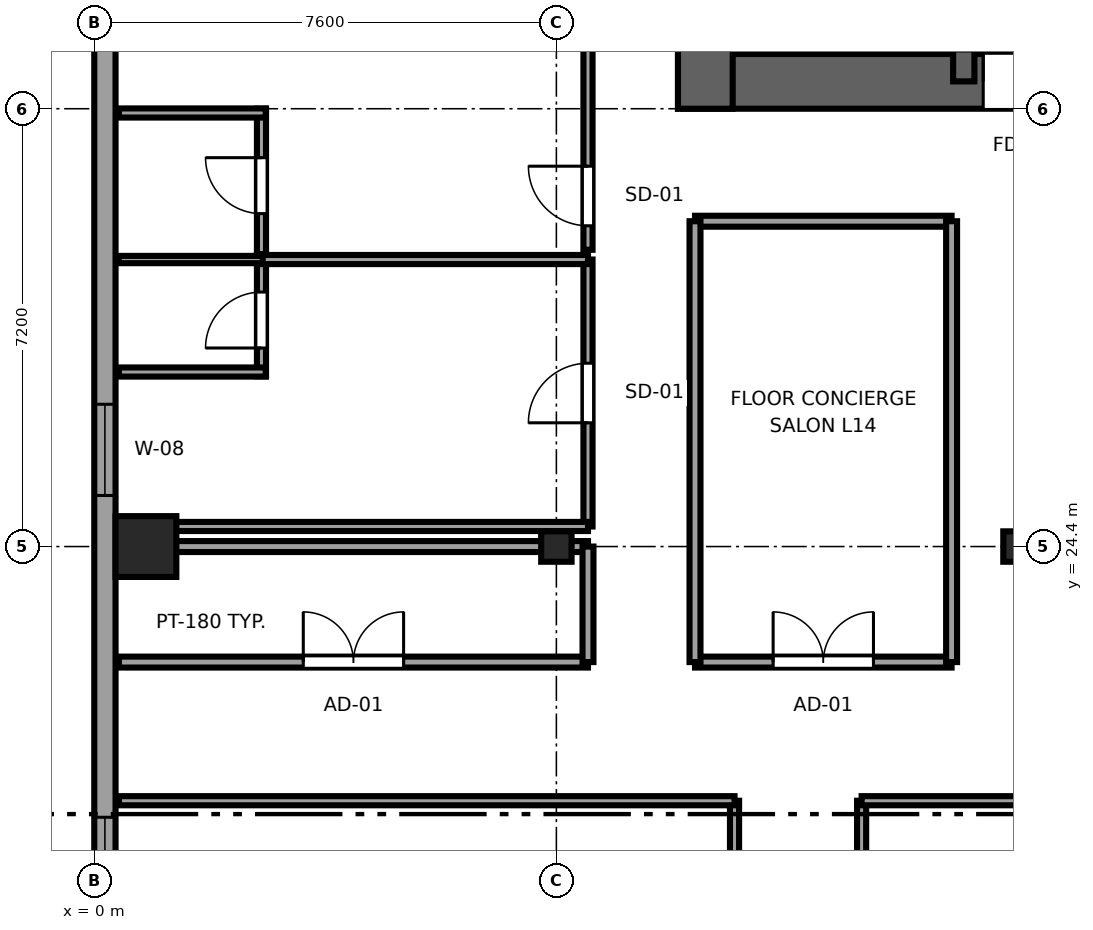
"""IFC4 building model, lengths in metres.
Left out: names, types, materials, properties, quantities, classifications, styles, units other than length and angle.
Written with IfcOpenShell. Run it as: python <this file> out.ifc"""

import sys

from ifc_helpers import new_model, si_unit, direction, frame, frame_2d, origin, origin_2d, place, context, subcontext, project, spatial, rectangle, i_section, extrude, source, transform, mapped, element, fill, save


model = new_model("IFC4")
c1 = context("Model", 3, precision=1e-05, world=origin(), true_north=direction((0.0, 1.0)))
c2 = subcontext(c1, "Body", "Model", "MODEL_VIEW")
j1 = project(units=[si_unit("LENGTHUNIT", "METRE"), si_unit("PLANEANGLEUNIT", "RADIAN")], contexts=[c1])
p1 = place(None, origin())
s1 = spatial("IfcSite", under=j1, at=p1, CompositionType="ELEMENT")
p2 = place(p1, origin())
s2 = spatial("IfcBuilding", under=s1, at=p2, CompositionType="ELEMENT")
p3 = place(p2, frame((0.0, 0.0, 60.4)))
s3 = spatial("IfcBuildingStorey", under=s2, at=p3, CompositionType="ELEMENT", Elevation=60.4)
p4 = place(p3, frame((9.6, 32.05, 0.0), z_axis=(0.0, 0.0, 1.0), x_axis=(1.0, 0.0, 0.0)))
e1 = element("IfcWall", 1, at=p4, inside=s3, PredefinedType="SHEAR", context=c2, shape_type="SweptSolid", body=[
    extrude(rectangle(XDim=26.8, YDim=0.9, at=frame_2d((13.4, 0.0))), origin(), (0.0, 0.0, 1.0), 3.55),
])
p5 = place(p4, frame((6.52, 0.0, 0.0), z_axis=(0.0, 0.0, 1.0), x_axis=(-1.0, 0.0, 0.0)))
e2 = element("IfcOpeningElement", 2, at=p5, cuts=e1, PredefinedType="OPENING", context=c2, shape_type="SweptSolid", body=[
    extrude(rectangle(XDim=1.5, YDim=2.04, at=frame_2d((0.75, 1.02))), frame((0.0, 0.46, 0.0), z_axis=(0.0, -1.0, 0.0), x_axis=(1.0, 0.0, 0.0)), (0.0, 0.0, 1.0), 0.92),
])
p6 = place(p4, frame((14.15, 0.0, 0.0), z_axis=(0.0, 0.0, 1.0), x_axis=(-1.0, 0.0, 0.0)))
e3 = element("IfcOpeningElement", 3, at=p6, cuts=e1, PredefinedType="OPENING", context=c2, shape_type="SweptSolid", body=[
    extrude(rectangle(XDim=1.5, YDim=2.04, at=frame_2d((0.75, 1.02))), frame((0.0, 0.46, 0.0), z_axis=(0.0, -1.0, 0.0), x_axis=(1.0, 0.0, 0.0)), (0.0, 0.0, 1.0), 0.92),
])
p7 = place(p4, frame((21.78, 0.0, 0.0), z_axis=(0.0, 0.0, 1.0), x_axis=(-1.0, 0.0, 0.0)))
e4 = element("IfcOpeningElement", 4, at=p7, cuts=e1, PredefinedType="OPENING", context=c2, shape_type="SweptSolid", body=[
    extrude(rectangle(XDim=1.5, YDim=2.04, at=frame_2d((0.75, 1.02))), frame((0.0, 0.46, 0.0), z_axis=(0.0, -1.0, 0.0), x_axis=(1.0, 0.0, 0.0)), (0.0, 0.0, 1.0), 0.92),
])
p8 = place(p4, frame((8.57, 0.0, 0.0), z_axis=(0.0, 0.0, 1.0), x_axis=(-1.0, 0.0, 0.0)))
e5 = element("IfcOpeningElement", 5, at=p8, cuts=e1, PredefinedType="OPENING", context=c2, shape_type="SweptSolid", body=[
    extrude(rectangle(XDim=0.82, YDim=2.01, at=frame_2d((0.41, 1.005))), frame((0.0, 0.46, 0.0), z_axis=(0.0, -1.0, 0.0), x_axis=(1.0, 0.0, 0.0)), (0.0, 0.0, 1.0), 0.92),
])
p9 = place(p4, frame((19.07, 0.0, 0.0), z_axis=(0.0, 0.0, 1.0), x_axis=(-1.0, 0.0, 0.0)))
e6 = element("IfcOpeningElement", 6, at=p9, cuts=e1, PredefinedType="OPENING", context=c2, shape_type="SweptSolid", body=[
    extrude(rectangle(XDim=0.82, YDim=2.01, at=frame_2d((0.41, 1.005))), frame((0.0, 0.46, 0.0), z_axis=(0.0, -1.0, 0.0), x_axis=(1.0, 0.0, 0.0)), (0.0, 0.0, 1.0), 0.92),
])
p10 = place(p3, frame((10.05, 31.6, 0.0), z_axis=(0.0, 0.0, 1.0), x_axis=(0.0, 1.0, 0.0)))
e7 = element("IfcWall", 7, at=p10, inside=s3, PredefinedType="SHEAR", context=c2, shape_type="SweptSolid", body=[
    extrude(rectangle(XDim=13.6, YDim=0.9, at=frame_2d((6.8, 0.0))), origin(), (0.0, 0.0, 1.0), 3.55),
])
p11 = place(p3, frame((14.3, 32.05, 0.0), z_axis=(0.0, 0.0, 1.0), x_axis=(0.0, 1.0, 0.0)))
e8 = element("IfcWall", 8, at=p11, inside=s3, PredefinedType="SHEAR", context=c2, shape_type="SweptSolid", body=[
    extrude(rectangle(XDim=12.7, YDim=0.35, at=frame_2d((6.35, 0.0))), origin(), (0.0, 0.0, 1.0), 3.55),
])
p12 = place(p11, frame((0.5, 0.0, 0.0)))
e9 = element("IfcOpeningElement", 9, at=p12, cuts=e8, PredefinedType="OPENING", context=c2, shape_type="SweptSolid", body=[
    extrude(rectangle(XDim=1.1, YDim=2.12, at=frame_2d((0.55, 1.06))), frame((0.0, 0.185, 0.0), z_axis=(0.0, -1.0, 0.0), x_axis=(1.0, 0.0, 0.0)), (0.0, 0.0, 1.0), 0.37),
])
m1 = source(origin(), c2, "Body", "SweptSolid", [
    extrude(rectangle(XDim=1.0, YDim=1.0, at=origin_2d()), origin(), (0.0, 0.0, 1.0), 3.55),
])
p13 = place(p3, frame((0.85, 24.4, 0.0), z_axis=(0.0, 0.0, 1.0), x_axis=(1.0, 0.0, 0.0)))
e10 = element("IfcColumn", 10, at=p13, inside=s3, PredefinedType="COLUMN", context=c2, shape_type="MappedRepresentation", body=[
    mapped(m1, transform((0.0, 0.0, 0.0), x_axis=(1.0, 0.0, 0.0), y_axis=(0.0, 1.0, 0.0), z_axis=(0.0, 0.0, 1.0), scale=1.0)),
])
m2 = source(origin(), c2, "Body", "SweptSolid", [
    extrude(i_section(OverallWidth=0.5, OverallDepth=0.5, WebThickness=0.028, FlangeThickness=0.045, at=origin_2d()), origin(), (0.0, 0.0, 1.0), 3.55),
])
for number, where, z_axis, x_axis in (
    (11, (7.6, 24.4, 0.0), (0.0, 0.0, 1.0), (1.0, 0.0, 0.0)),
    (12, (15.2, 24.4, 0.0), (0.0, 0.0, 1.0), (1.0, 0.0, 0.0)),
):
    element("IfcColumn", number, at=place(p3, frame(where, z_axis=z_axis, x_axis=x_axis)), inside=s3, PredefinedType="COLUMN", context=c2, shape_type="MappedRepresentation", body=[
        mapped(m2, transform((0.0, 0.0, 0.0), x_axis=(1.0, 0.0, 0.0), y_axis=(0.0, 1.0, 0.0), z_axis=(0.0, 0.0, 1.0), scale=1.0)),
    ])
p14 = place(p3, frame((0.175, 41.383, 0.0), z_axis=(0.0, 0.0, 1.0), x_axis=(0.0, -1.0, 0.0)))
e13 = element("IfcWall", 13, at=p14, inside=s3, PredefinedType="SOLIDWALL", context=c2, shape_type="SweptSolid", body=[
    extrude(rectangle(XDim=36.766, YDim=0.35, at=frame_2d((18.383, 0.0))), origin(), (0.0, 0.0, 1.0), 3.37),
])
p15 = place(p14, frame((1.676, 0.0, 0.68)))
e14 = element("IfcOpeningElement", 14, at=p15, cuts=e13, PredefinedType="OPENING", context=c2, shape_type="SweptSolid", body=[
    extrude(rectangle(XDim=1.8, YDim=1.85, at=frame_2d((0.9, 0.925))), frame((0.0, 0.185, 0.0), z_axis=(0.0, -1.0, 0.0), x_axis=(1.0, 0.0, 0.0)), (0.0, 0.0, 1.0), 0.37),
])
p16 = place(p14, frame((4.578, 0.0, 0.68)))
e15 = element("IfcOpeningElement", 15, at=p16, cuts=e13, PredefinedType="OPENING", context=c2, shape_type="SweptSolid", body=[
    extrude(rectangle(XDim=1.8, YDim=1.85, at=frame_2d((0.9, 0.925))), frame((0.0, 0.185, 0.0), z_axis=(0.0, -1.0, 0.0), x_axis=(1.0, 0.0, 0.0)), (0.0, 0.0, 1.0), 0.37),
])
p17 = place(p14, frame((21.435, 0.0, 0.68)))
e16 = element("IfcOpeningElement", 16, at=p17, cuts=e13, PredefinedType="OPENING", context=c2, shape_type="SweptSolid", body=[
    extrude(rectangle(XDim=1.8, YDim=1.85, at=frame_2d((0.9, 0.925))), frame((0.0, 0.185, 0.0), z_axis=(0.0, -1.0, 0.0), x_axis=(1.0, 0.0, 0.0)), (0.0, 0.0, 1.0), 0.37),
])
p18 = place(p14, frame((26.436, 0.0, 0.68)))
e17 = element("IfcOpeningElement", 17, at=p18, cuts=e13, PredefinedType="OPENING", context=c2, shape_type="SweptSolid", body=[
    extrude(rectangle(XDim=1.8, YDim=1.85, at=frame_2d((0.9, 0.925))), frame((0.0, 0.185, 0.0), z_axis=(0.0, -1.0, 0.0), x_axis=(1.0, 0.0, 0.0)), (0.0, 0.0, 1.0), 0.37),
])
p19 = place(p14, frame((28.788, 0.0, 0.68)))
e18 = element("IfcOpeningElement", 18, at=p19, cuts=e13, PredefinedType="OPENING", context=c2, shape_type="SweptSolid", body=[
    extrude(rectangle(XDim=1.8, YDim=1.85, at=frame_2d((0.9, 0.925))), frame((0.0, 0.185, 0.0), z_axis=(0.0, -1.0, 0.0), x_axis=(1.0, 0.0, 0.0)), (0.0, 0.0, 1.0), 0.37),
])
p20 = place(p14, frame((33.893, 0.0, 0.62)))
e19 = element("IfcOpeningElement", 19, at=p20, cuts=e13, PredefinedType="OPENING", context=c2, shape_type="SweptSolid", body=[
    extrude(rectangle(XDim=1.5, YDim=1.55, at=frame_2d((0.75, 0.775))), frame((0.0, 0.185, 0.0), z_axis=(0.0, -1.0, 0.0), x_axis=(1.0, 0.0, 0.0)), (0.0, 0.0, 1.0), 0.37),
])
p21 = place(p14, frame((14.643, 0.0, 0.62)))
e20 = element("IfcOpeningElement", 20, at=p21, cuts=e13, PredefinedType="OPENING", context=c2, shape_type="SweptSolid", body=[
    extrude(rectangle(XDim=1.5, YDim=1.55, at=frame_2d((0.75, 0.775))), frame((0.0, 0.185, 0.0), z_axis=(0.0, -1.0, 0.0), x_axis=(1.0, 0.0, 0.0)), (0.0, 0.0, 1.0), 0.37),
])
p22 = place(p3, frame((2.75, 27.2, 0.0), z_axis=(0.0, 0.0, 1.0), x_axis=(0.0, 1.0, 0.0)))
e21 = element("IfcWall", 21, at=p22, inside=s3, PredefinedType="PARTITIONING", context=c2, shape_type="SweptSolid", body=[
    extrude(rectangle(XDim=1.99, YDim=0.15, at=frame_2d((0.995, 0.0))), origin(), (0.0, 0.0, 1.0), 3.37),
])
p23 = place(p22, frame((0.465, 0.0, 0.0)))
e22 = element("IfcOpeningElement", 22, at=p23, cuts=e21, PredefinedType="OPENING", context=c2, shape_type="SweptSolid", body=[
    extrude(rectangle(XDim=0.92, YDim=2.01, at=frame_2d((0.46, 1.005))), frame((0.0, 0.085, 0.0), z_axis=(0.0, -1.0, 0.0), x_axis=(1.0, 0.0, 0.0)), (0.0, 0.0, 1.0), 0.17),
])
p24 = place(p3, frame((0.405, 27.27, 0.0), z_axis=(0.0, 0.0, 1.0), x_axis=(1.0, 0.0, 0.0)))
e23 = element("IfcWall", 23, at=p24, inside=s3, PredefinedType="PARTITIONING", context=c2, shape_type="SweptSolid", body=[
    extrude(rectangle(XDim=2.415, YDim=0.15, at=frame_2d((1.208, 0.0))), origin(), (0.0, 0.0, 1.0), 3.37),
])
p25 = place(p3, frame((0.405, 29.12, 0.0), z_axis=(0.0, 0.0, 1.0), x_axis=(1.0, 0.0, 0.0)))
e24 = element("IfcWall", 24, at=p25, inside=s3, PredefinedType="PLUMBINGWALL", context=c2, shape_type="SweptSolid", body=[
    extrude(rectangle(XDim=2.415, YDim=0.12, at=frame_2d((1.208, 0.0))), origin(), (0.0, 0.0, 1.0), 2.748),
])
p26 = place(p3, frame((2.75, 29.21, 0.0), z_axis=(0.0, 0.0, 1.0), x_axis=(0.0, 1.0, 0.0)))
e25 = element("IfcWall", 25, at=p26, inside=s3, PredefinedType="PARTITIONING", context=c2, shape_type="SweptSolid", body=[
    extrude(rectangle(XDim=2.39, YDim=0.15, at=frame_2d((1.195, 0.0))), origin(), (0.0, 0.0, 1.0), 3.37),
])
p27 = place(p26, frame((0.665, 0.0, 0.0)))
e26 = element("IfcOpeningElement", 26, at=p27, cuts=e25, PredefinedType="OPENING", context=c2, shape_type="SweptSolid", body=[
    extrude(rectangle(XDim=0.92, YDim=2.01, at=frame_2d((0.46, 1.005))), frame((0.0, 0.085, 0.0), z_axis=(0.0, -1.0, 0.0), x_axis=(1.0, 0.0, 0.0)), (0.0, 0.0, 1.0), 0.17),
])
p28 = place(p3, frame((0.405, 31.53, 0.0), z_axis=(0.0, 0.0, 1.0), x_axis=(1.0, 0.0, 0.0)))
e27 = element("IfcWall", 27, at=p28, inside=s3, PredefinedType="PARTITIONING", context=c2, shape_type="SweptSolid", body=[
    extrude(rectangle(XDim=2.415, YDim=0.15, at=frame_2d((1.208, 0.0))), origin(), (0.0, 0.0, 1.0), 3.37),
])
p29 = place(p3, frame((10.53, 17.41, 0.0), z_axis=(0.0, 0.0, 1.0), x_axis=(0.0, 1.0, 0.0)))
e28 = element("IfcWall", 28, at=p29, inside=s3, PredefinedType="PARTITIONING", context=c2, shape_type="SweptSolid", body=[
    extrude(rectangle(XDim=2.81, YDim=0.15, at=frame_2d((1.405, 0.0))), origin(), (0.0, 0.0, 1.0), 3.37),
])
p30 = place(p29, frame((0.895, 0.0, 0.0)))
e29 = element("IfcOpeningElement", 29, at=p30, cuts=e28, PredefinedType="OPENING", context=c2, shape_type="SweptSolid", body=[
    extrude(rectangle(XDim=0.98, YDim=2.12, at=frame_2d((0.49, 1.06))), frame((0.0, 0.085, 0.0), z_axis=(0.0, -1.0, 0.0), x_axis=(1.0, 0.0, 0.0)), (0.0, 0.0, 1.0), 0.17),
])
p31 = place(p3, frame((0.405, 20.22, 0.0), z_axis=(0.0, 0.0, 1.0), x_axis=(1.0, 0.0, 0.0)))
e30 = element("IfcWall", 30, at=p31, inside=s3, PredefinedType="PARTITIONING", context=c2, shape_type="SweptSolid", body=[
    extrude(rectangle(XDim=10.125, YDim=0.15, at=frame_2d((5.062, 0.0))), origin(), (0.0, 0.0, 1.0), 3.37),
])
p32 = place(p3, frame((12.62, 12.21, 0.0), z_axis=(0.0, 0.0, 1.0), x_axis=(0.0, 1.0, 0.0)))
e31 = element("IfcWall", 31, at=p32, inside=s3, PredefinedType="PARTITIONING", context=c2, shape_type="SweptSolid", body=[
    extrude(rectangle(XDim=8.01, YDim=0.15, at=frame_2d((4.005, 0.0))), origin(), (0.0, 0.0, 1.0), 3.37),
])
p33 = place(p32, frame((3.495, 0.0, 0.0)))
e32 = element("IfcOpeningElement", 32, at=p33, cuts=e31, PredefinedType="OPENING", context=c2, shape_type="SweptSolid", body=[
    extrude(rectangle(XDim=0.98, YDim=2.12, at=frame_2d((0.49, 1.06))), frame((0.0, 0.085, 0.0), z_axis=(0.0, -1.0, 0.0), x_axis=(1.0, 0.0, 0.0)), (0.0, 0.0, 1.0), 0.17),
])
p34 = place(p3, frame((12.62, 20.22, 0.0), z_axis=(0.0, 0.0, 1.0), x_axis=(1.0, 0.0, 0.0)))
e33 = element("IfcWall", 33, at=p34, inside=s3, PredefinedType="PARTITIONING", context=c2, shape_type="SweptSolid", body=[
    extrude(rectangle(XDim=9.73, YDim=0.15, at=frame_2d((4.865, 0.0))), origin(), (0.0, 0.0, 1.0), 2.954),
])
p35 = place(p3, frame((0.405, 22.5, 0.0), z_axis=(0.0, 0.0, 1.0), x_axis=(1.0, 0.0, 0.0)))
e34 = element("IfcWall", 34, at=p35, inside=s3, PredefinedType="PARTITIONING", context=c2, shape_type="SweptSolid", body=[
    extrude(rectangle(XDim=7.715, YDim=0.18, at=frame_2d((3.857, 0.0))), origin(), (0.0, 0.0, 1.0), 3.37),
])
p36 = place(p35, frame((3.032, 0.0, 0.0)))
e35 = element("IfcOpeningElement", 35, at=p36, cuts=e34, PredefinedType="OPENING", context=c2, shape_type="SweptSolid", body=[
    extrude(rectangle(XDim=1.65, YDim=2.15, at=frame_2d((0.825, 1.075))), frame((0.0, 0.1, 0.0), z_axis=(0.0, -1.0, 0.0), x_axis=(1.0, 0.0, 0.0)), (0.0, 0.0, 1.0), 0.2),
])
p37 = place(p3, frame((0.405, 24.4, 0.0), z_axis=(0.0, 0.0, 1.0), x_axis=(1.0, 0.0, 0.0)))
e36 = element("IfcWall", 36, at=p37, inside=s3, PredefinedType="PARTITIONING", context=c2, shape_type="SweptSolid", body=[
    extrude(rectangle(XDim=7.715, YDim=0.18, at=frame_2d((3.857, 0.0))), origin(), (0.0, 0.0, 1.0), 2.748),
])
p38 = place(p3, frame((8.12, 22.5, 0.0), z_axis=(0.0, 0.0, 1.0), x_axis=(0.0, 1.0, 0.0)))
e37 = element("IfcWall", 37, at=p38, inside=s3, PredefinedType="PARTITIONING", context=c2, shape_type="SweptSolid", body=[
    extrude(rectangle(XDim=1.9, YDim=0.18, at=frame_2d((0.95, 0.0))), origin(), (0.0, 0.0, 1.0), 3.37),
])
p39 = place(p3, frame((8.12, 24.73, 0.0), z_axis=(0.0, 0.0, 1.0), x_axis=(0.0, 1.0, 0.0)))
e38 = element("IfcWall", 38, at=p39, inside=s3, PredefinedType="PARTITIONING", context=c2, shape_type="SweptSolid", body=[
    extrude(rectangle(XDim=4.39, YDim=0.15, at=frame_2d((2.195, 0.0))), origin(), (0.0, 0.0, 1.0), 3.37),
])
p40 = place(p39, frame((1.705, 0.0, 0.0)))
e39 = element("IfcOpeningElement", 39, at=p40, cuts=e38, PredefinedType="OPENING", context=c2, shape_type="SweptSolid", body=[
    extrude(rectangle(XDim=0.98, YDim=2.12, at=frame_2d((0.49, 1.06))), frame((0.0, 0.085, 0.0), z_axis=(0.0, -1.0, 0.0), x_axis=(1.0, 0.0, 0.0)), (0.0, 0.0, 1.0), 0.17),
])
p41 = place(p3, frame((0.405, 24.73, 0.0), z_axis=(0.0, 0.0, 1.0), x_axis=(1.0, 0.0, 0.0)))
e40 = element("IfcWall", 40, at=p41, inside=s3, PredefinedType="PARTITIONING", context=c2, shape_type="SweptSolid", body=[
    extrude(rectangle(XDim=7.715, YDim=0.15, at=frame_2d((3.857, 0.0))), origin(), (0.0, 0.0, 1.0), 3.37),
])
p42 = place(p3, frame((2.77, 29.12, 0.0), z_axis=(0.0, 0.0, 1.0), x_axis=(1.0, 0.0, 0.0)))
e41 = element("IfcWall", 41, at=p42, inside=s3, PredefinedType="PARTITIONING", context=c2, shape_type="SweptSolid", body=[
    extrude(rectangle(XDim=5.35, YDim=0.15, at=frame_2d((2.675, 0.0))), origin(), (0.0, 0.0, 1.0), 2.748),
])
p43 = place(p3, frame((8.12, 29.28, 0.0), z_axis=(0.0, 0.0, 1.0), x_axis=(0.0, 1.0, 0.0)))
e42 = element("IfcWall", 42, at=p43, inside=s3, PredefinedType="PARTITIONING", context=c2, shape_type="SweptSolid", body=[
    extrude(rectangle(XDim=16.315, YDim=0.15, at=frame_2d((8.157, 0.0))), origin(), (0.0, 0.0, 1.0), 3.37),
])
p44 = place(p43, frame((0.395, 0.0, 0.0)))
e43 = element("IfcOpeningElement", 43, at=p44, cuts=e42, PredefinedType="OPENING", context=c2, shape_type="SweptSolid", body=[
    extrude(rectangle(XDim=0.98, YDim=2.12, at=frame_2d((0.49, 1.06))), frame((0.0, 0.085, 0.0), z_axis=(0.0, -1.0, 0.0), x_axis=(1.0, 0.0, 0.0)), (0.0, 0.0, 1.0), 0.17),
])
p45 = place(p3, frame((9.88, 22.5, 0.0), z_axis=(0.0, 0.0, 1.0), x_axis=(1.0, 0.0, 0.0)))
e44 = element("IfcWall", 44, at=p45, inside=s3, PredefinedType="PARTITIONING", context=c2, shape_type="SweptSolid", body=[
    extrude(rectangle(XDim=4.22, YDim=0.18, at=frame_2d((2.11, 0.0))), origin(), (0.0, 0.0, 1.0), 3.37),
])
p46 = place(p45, frame((1.285, 0.0, 0.0)))
e45 = element("IfcOpeningElement", 45, at=p46, cuts=e44, PredefinedType="OPENING", context=c2, shape_type="SweptSolid", body=[
    extrude(rectangle(XDim=1.65, YDim=2.15, at=frame_2d((0.825, 1.075))), frame((0.0, 0.1, 0.0), z_axis=(0.0, -1.0, 0.0), x_axis=(1.0, 0.0, 0.0)), (0.0, 0.0, 1.0), 0.2),
])
p47 = place(p3, frame((9.88, 29.75, 0.0), z_axis=(0.0, 0.0, 1.0), x_axis=(1.0, 0.0, 0.0)))
e46 = element("IfcWall", 46, at=p47, inside=s3, PredefinedType="PARTITIONING", context=c2, shape_type="SweptSolid", body=[
    extrude(rectangle(XDim=4.22, YDim=0.18, at=frame_2d((2.11, 0.0))), origin(), (0.0, 0.0, 1.0), 3.37),
])
for number, where, z_axis, x_axis in (
    (47, (9.88, 22.5, 0.0), (0.0, 0.0, 1.0), (0.0, 1.0, 0.0)),
    (48, (14.1, 22.5, 0.0), (0.0, 0.0, 1.0), (0.0, 1.0, 0.0)),
):
    element("IfcWall", number, at=place(p3, frame(where, z_axis=z_axis, x_axis=x_axis)), inside=s3, PredefinedType="PARTITIONING", context=c2, shape_type="SweptSolid", body=[
        extrude(rectangle(XDim=7.25, YDim=0.18, at=frame_2d((3.625, 0.0))), origin(), (0.0, 0.0, 1.0), 3.37),
    ])
m3 = source(origin(), c2, "Body", "SweptSolid", [
    extrude(rectangle(XDim=1.8, YDim=1.85, at=frame_2d((0.9, 0.925))), frame((0.0, 0.09, 0.0), z_axis=(0.0, -1.0, 0.0), x_axis=(1.0, 0.0, 0.0)), (0.0, 0.0, 1.0), 0.06),
])
p48 = place(p17, origin())
e49 = element("IfcWindow", 49, at=p48, inside=s3, PartitioningType="TRIPLE_PANEL_HORIZONTAL", PredefinedType="WINDOW", context=c2, shape_type="MappedRepresentation", body=[
    mapped(m3, transform((0.0, 0.0, 0.0), x_axis=(1.0, 0.0, 0.0), y_axis=(0.0, 1.0, 0.0), z_axis=(0.0, 0.0, 1.0), scale=1.0)),
])
fill(e16, e49)
m4 = source(origin(), c2, "Body", "SweptSolid", [
    extrude(rectangle(XDim=1.5, YDim=1.55, at=frame_2d((0.75, 0.775))), frame((0.0, 0.09, 0.0), z_axis=(0.0, -1.0, 0.0), x_axis=(1.0, 0.0, 0.0)), (0.0, 0.0, 1.0), 0.06),
])
p49 = place(p21, origin())
e50 = element("IfcWindow", 50, at=p49, inside=s3, PartitioningType="SINGLE_PANEL", PredefinedType="WINDOW", context=c2, shape_type="MappedRepresentation", body=[
    mapped(m4, transform((0.0, 0.0, 0.0), x_axis=(1.0, 0.0, 0.0), y_axis=(0.0, 1.0, 0.0), z_axis=(0.0, 0.0, 1.0), scale=1.0)),
])
fill(e20, e50)
m5 = source(origin(), c2, "Body", "SweptSolid", [
    extrude(rectangle(XDim=1.5, YDim=2.04, at=frame_2d((0.75, 1.02))), frame((0.0, 0.025, 0.0), z_axis=(0.0, -1.0, 0.0), x_axis=(1.0, 0.0, 0.0)), (0.0, 0.0, 1.0), 0.05),
])
p50 = place(p5, origin())
e51 = element("IfcDoor", 51, at=p50, inside=s3, OperationType="DOUBLE_DOOR_SINGLE_SWING", PredefinedType="DOOR", context=c2, shape_type="MappedRepresentation", body=[
    mapped(m5, transform((0.0, 0.0, 0.0), x_axis=(1.0, 0.0, 0.0), y_axis=(0.0, 1.0, 0.0), z_axis=(0.0, 0.0, 1.0), scale=1.0)),
])
fill(e2, e51)
m6 = source(origin(), c2, "Body", "SweptSolid", [
    extrude(rectangle(XDim=0.92, YDim=2.01, at=frame_2d((0.46, 1.005))), frame((0.0, 0.025, 0.0), z_axis=(0.0, -1.0, 0.0), x_axis=(1.0, 0.0, 0.0)), (0.0, 0.0, 1.0), 0.05),
])
p51 = place(p23, origin())
e52 = element("IfcDoor", 52, at=p51, inside=s3, OperationType="SINGLE_SWING_LEFT", PredefinedType="DOOR", context=c2, shape_type="MappedRepresentation", body=[
    mapped(m6, transform((0.0, 0.0, 0.0), x_axis=(1.0, 0.0, 0.0), y_axis=(0.0, 1.0, 0.0), z_axis=(0.0, 0.0, 1.0), scale=1.0)),
])
fill(e22, e52)
p52 = place(p27, origin())
e53 = element("IfcDoor", 53, at=p52, inside=s3, OperationType="SINGLE_SWING_RIGHT", PredefinedType="DOOR", context=c2, shape_type="MappedRepresentation", body=[
    mapped(m6, transform((0.0, 0.0, 0.0), x_axis=(1.0, 0.0, 0.0), y_axis=(0.0, 1.0, 0.0), z_axis=(0.0, 0.0, 1.0), scale=1.0)),
])
fill(e26, e53)
m7 = source(origin(), c2, "Body", "SweptSolid", [
    extrude(rectangle(XDim=1.65, YDim=2.15, at=frame_2d((0.825, 1.075))), frame((0.0, 0.025, 0.0), z_axis=(0.0, -1.0, 0.0), x_axis=(1.0, 0.0, 0.0)), (0.0, 0.0, 1.0), 0.05),
])
p53 = place(p36, origin())
e54 = element("IfcDoor", 54, at=p53, inside=s3, OperationType="DOUBLE_DOOR_SINGLE_SWING", PredefinedType="DOOR", context=c2, shape_type="MappedRepresentation", body=[
    mapped(m7, transform((0.0, 0.0, 0.0), x_axis=(1.0, 0.0, 0.0), y_axis=(0.0, 1.0, 0.0), z_axis=(0.0, 0.0, 1.0), scale=1.0)),
])
fill(e35, e54)
m8 = source(origin(), c2, "Body", "SweptSolid", [
    extrude(rectangle(XDim=0.98, YDim=2.12, at=frame_2d((0.49, 1.06))), frame((0.0, 0.025, 0.0), z_axis=(0.0, -1.0, 0.0), x_axis=(1.0, 0.0, 0.0)), (0.0, 0.0, 1.0), 0.05),
])
p54 = place(p40, origin())
e55 = element("IfcDoor", 55, at=p54, inside=s3, OperationType="SINGLE_SWING_LEFT", PredefinedType="DOOR", context=c2, shape_type="MappedRepresentation", body=[
    mapped(m8, transform((0.0, 0.0, 0.0), x_axis=(1.0, 0.0, 0.0), y_axis=(0.0, 1.0, 0.0), z_axis=(0.0, 0.0, 1.0), scale=1.0)),
])
fill(e39, e55)
p55 = place(p44, origin())
e56 = element("IfcDoor", 56, at=p55, inside=s3, OperationType="SINGLE_SWING_RIGHT", PredefinedType="DOOR", context=c2, shape_type="MappedRepresentation", body=[
    mapped(m8, transform((0.0, 0.0, 0.0), x_axis=(1.0, 0.0, 0.0), y_axis=(0.0, 1.0, 0.0), z_axis=(0.0, 0.0, 1.0), scale=1.0)),
])
fill(e43, e56)
p56 = place(p46, origin())
e57 = element("IfcDoor", 57, at=p56, inside=s3, OperationType="DOUBLE_DOOR_SINGLE_SWING", PredefinedType="DOOR", context=c2, shape_type="MappedRepresentation", body=[
    mapped(m7, transform((0.0, 0.0, 0.0), x_axis=(1.0, 0.0, 0.0), y_axis=(0.0, 1.0, 0.0), z_axis=(0.0, 0.0, 1.0), scale=1.0)),
])
fill(e45, e57)
save(model, sys.argv[1])
